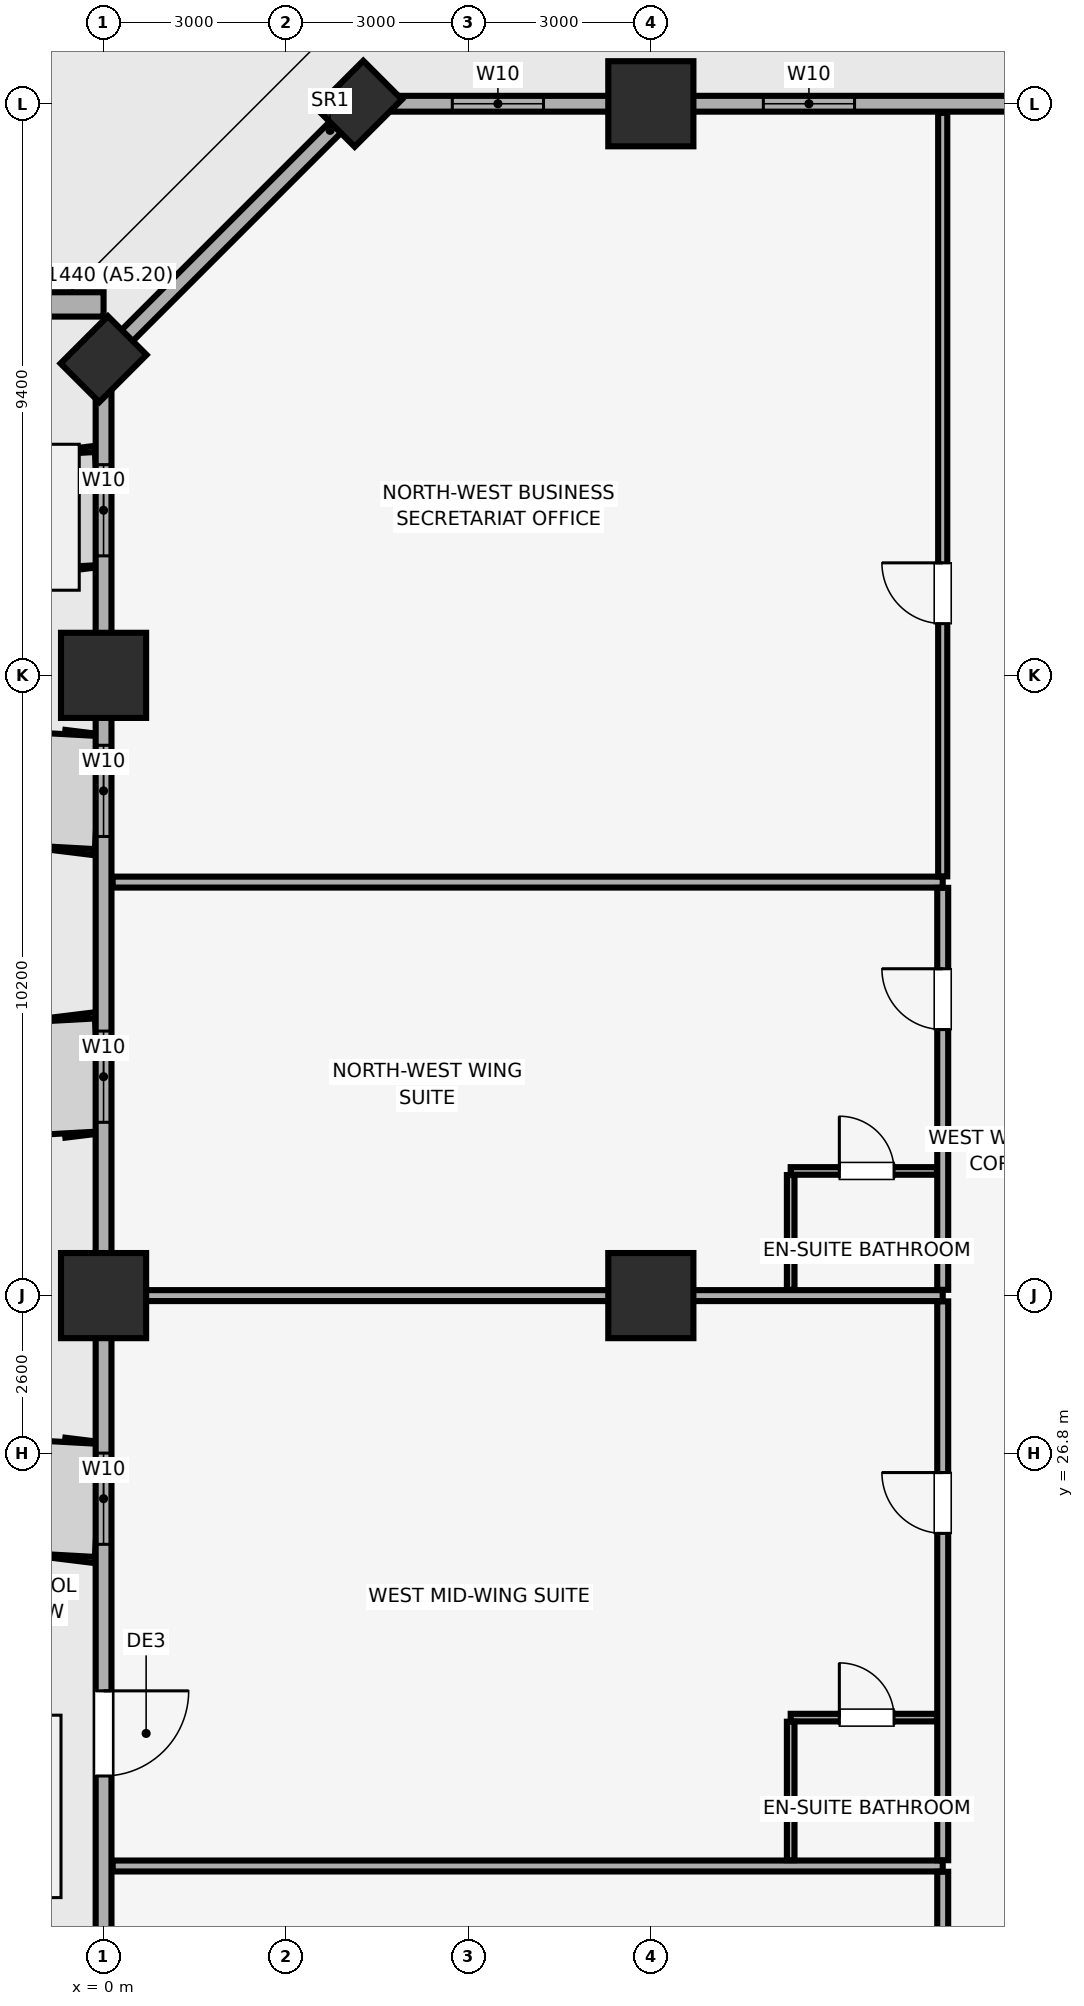
"""IFC4 building model, lengths in metres.
Left out: names, types, materials, properties, quantities, classifications, styles, units other than length and angle.
Written with IfcOpenShell. Run it as: python <this file> out.ifc"""

import sys

from ifc_helpers import new_model, si_unit, direction, frame, frame_2d, origin, origin_2d, place, context, subcontext, project, spatial, rectangle, extrude, element, fill, save


model = new_model("IFC4")
c1 = context("Model", 3, precision=1e-05, world=origin(), true_north=direction((0.0, 1.0)))
c2 = subcontext(c1, "Body", "Model", "MODEL_VIEW")
j1 = project(units=[si_unit("LENGTHUNIT", "METRE"), si_unit("PLANEANGLEUNIT", "RADIAN")], contexts=[c1])
p1 = place(None, origin())
s1 = spatial("IfcSite", under=j1, at=p1, CompositionType="ELEMENT")
p2 = place(p1, origin())
s2 = spatial("IfcBuilding", under=s1, at=p2, CompositionType="ELEMENT")
p3 = place(p2, frame((0.0, 0.0, 31.4)))
s3 = spatial("IfcBuildingStorey", under=s2, at=p3, CompositionType="ELEMENT", Elevation=31.4)
for number, where, z_axis, x_axis in (
    (1, (0.0, 29.4, 0.0), (0.0, 0.0, 1.0), (1.0, 0.0, 0.0)),
    (2, (0.0, 39.6, 0.0), (0.0, 0.0, 1.0), (1.0, 0.0, 0.0)),
):
    element("IfcColumn", number, at=place(p3, frame(where, z_axis=z_axis, x_axis=x_axis)), inside=s3, PredefinedType="COLUMN", context=c2, shape_type="SweptSolid", body=[
        extrude(rectangle(XDim=1.4, YDim=1.4, at=origin_2d()), origin(), (0.0, 0.0, 1.0), 3.51),
    ])
for number, where, z_axis, x_axis in (
    (3, (4.2, 49.0, 0.0), (0.0, 0.0, 1.0), (0.707, 0.707, 0.0)),
    (4, (0.0, 44.8, 0.0), (0.0, 0.0, 1.0), (0.707, 0.707, 0.0)),
):
    element("IfcColumn", number, at=place(p3, frame(where, z_axis=z_axis, x_axis=x_axis)), inside=s3, PredefinedType="PILASTER", context=c2, shape_type="SweptSolid", body=[
        extrude(rectangle(XDim=1.1, YDim=0.9, at=origin_2d()), origin(), (0.0, 0.0, 1.0), 3.51),
    ])
for number, where, z_axis, x_axis in (
    (5, (9.0, 29.4, 0.0), (0.0, 0.0, 1.0), (1.0, 0.0, 0.0)),
    (6, (9.0, 49.0, 0.0), (0.0, 0.0, 1.0), (1.0, 0.0, 0.0)),
):
    element("IfcColumn", number, at=place(p3, frame(where, z_axis=z_axis, x_axis=x_axis)), inside=s3, PredefinedType="COLUMN", context=c2, shape_type="SweptSolid", body=[
        extrude(rectangle(XDim=1.4, YDim=1.4, at=origin_2d()), origin(), (0.0, 0.0, 1.0), 3.51),
    ])
p4 = place(p3, frame((79.8, 49.0, 0.0), z_axis=(0.0, 0.0, 1.0), x_axis=(-1.0, 0.0, 0.0)))
e7 = element("IfcWall", 7, at=p4, inside=s3, PredefinedType="SOLIDWALL", context=c2, shape_type="SweptSolid", body=[
    extrude(rectangle(XDim=75.6, YDim=0.26, at=frame_2d((37.8, 0.0))), origin(), (0.0, 0.0, 1.0), 2.56),
])
p5 = place(p4, frame((72.565, 0.0, 0.85)))
e8 = element("IfcOpeningElement", 8, at=p5, cuts=e7, PredefinedType="OPENING", context=c2, shape_type="SweptSolid", body=[
    extrude(rectangle(XDim=1.5, YDim=1.4, at=frame_2d((0.75, 0.7))), frame((0.0, 0.14, 0.0), z_axis=(0.0, -1.0, 0.0), x_axis=(1.0, 0.0, 0.0)), (0.0, 0.0, 1.0), 0.28),
])
p6 = place(p4, frame((67.45, 0.0, 0.85)))
e9 = element("IfcOpeningElement", 9, at=p6, cuts=e7, PredefinedType="OPENING", context=c2, shape_type="SweptSolid", body=[
    extrude(rectangle(XDim=1.5, YDim=1.4, at=frame_2d((0.75, 0.7))), frame((0.0, 0.14, 0.0), z_axis=(0.0, -1.0, 0.0), x_axis=(1.0, 0.0, 0.0)), (0.0, 0.0, 1.0), 0.28),
])
p7 = place(p4, frame((6.65, 0.0, 0.85)))
e10 = element("IfcOpeningElement", 10, at=p7, cuts=e7, PredefinedType="OPENING", context=c2, shape_type="SweptSolid", body=[
    extrude(rectangle(XDim=1.5, YDim=1.4, at=frame_2d((0.75, 0.7))), frame((0.0, 0.14, 0.0), z_axis=(0.0, -1.0, 0.0), x_axis=(1.0, 0.0, 0.0)), (0.0, 0.0, 1.0), 0.28),
])
p8 = place(p4, frame((1.535, 0.0, 0.85)))
e11 = element("IfcOpeningElement", 11, at=p8, cuts=e7, PredefinedType="OPENING", context=c2, shape_type="SweptSolid", body=[
    extrude(rectangle(XDim=1.5, YDim=1.4, at=frame_2d((0.75, 0.7))), frame((0.0, 0.14, 0.0), z_axis=(0.0, -1.0, 0.0), x_axis=(1.0, 0.0, 0.0)), (0.0, 0.0, 1.0), 0.28),
])
p9 = place(p4, frame((51.365, 0.0, 0.9)))
e12 = element("IfcOpeningElement", 12, at=p9, cuts=e7, PredefinedType="OPENING", context=c2, shape_type="SweptSolid", body=[
    extrude(rectangle(XDim=1.5, YDim=1.4, at=frame_2d((0.75, 0.7))), frame((0.0, 0.14, 0.0), z_axis=(0.0, -1.0, 0.0), x_axis=(1.0, 0.0, 0.0)), (0.0, 0.0, 1.0), 0.28),
])
p10 = place(p4, frame((46.0, 0.0, 0.9)))
e13 = element("IfcOpeningElement", 13, at=p10, cuts=e7, PredefinedType="OPENING", context=c2, shape_type="SweptSolid", body=[
    extrude(rectangle(XDim=1.5, YDim=1.4, at=frame_2d((0.75, 0.7))), frame((0.0, 0.14, 0.0), z_axis=(0.0, -1.0, 0.0), x_axis=(1.0, 0.0, 0.0)), (0.0, 0.0, 1.0), 0.28),
])
p11 = place(p4, frame((29.15, 0.0, 0.9)))
e14 = element("IfcOpeningElement", 14, at=p11, cuts=e7, PredefinedType="OPENING", context=c2, shape_type="SweptSolid", body=[
    extrude(rectangle(XDim=1.5, YDim=1.4, at=frame_2d((0.75, 0.7))), frame((0.0, 0.14, 0.0), z_axis=(0.0, -1.0, 0.0), x_axis=(1.0, 0.0, 0.0)), (0.0, 0.0, 1.0), 0.28),
])
p12 = place(p4, frame((23.485, 0.0, 0.9)))
e15 = element("IfcOpeningElement", 15, at=p12, cuts=e7, PredefinedType="OPENING", context=c2, shape_type="SweptSolid", body=[
    extrude(rectangle(XDim=1.5, YDim=1.4, at=frame_2d((0.75, 0.7))), frame((0.0, 0.14, 0.0), z_axis=(0.0, -1.0, 0.0), x_axis=(1.0, 0.0, 0.0)), (0.0, 0.0, 1.0), 0.28),
])
p13 = place(p3, frame((4.2, 49.0, 0.0), z_axis=(0.0, 0.0, 1.0), x_axis=(-0.707106781187, -0.707106781187, 0.0)))
e16 = element("IfcWall", 16, at=p13, inside=s3, PredefinedType="SOLIDWALL", context=c2, shape_type="SweptSolid", body=[
    extrude(rectangle(XDim=5.94, YDim=0.26, at=frame_2d((2.97, 0.0))), origin(), (0.0, 0.0, 1.0), 2.56),
])
p14 = place(p3, frame((0.0, 44.8, 0.0), z_axis=(0.0, 0.0, 1.0), x_axis=(0.0, -1.0, 0.0)))
e17 = element("IfcWall", 17, at=p14, inside=s3, PredefinedType="SOLIDWALL", context=c2, shape_type="SweptSolid", body=[
    extrude(rectangle(XDim=40.6, YDim=0.26, at=frame_2d((20.3, 0.0))), origin(), (0.0, 0.0, 1.0), 2.56),
])
p15 = place(p14, frame((21.9, 0.0, 0.0)))
e18 = element("IfcOpeningElement", 18, at=p15, cuts=e17, PredefinedType="OPENING", context=c2, shape_type="SweptSolid", body=[
    extrude(rectangle(XDim=1.4, YDim=2.2, at=frame_2d((0.7, 1.1))), frame((0.0, 0.14, 0.0), z_axis=(0.0, -1.0, 0.0), x_axis=(1.0, 0.0, 0.0)), (0.0, 0.0, 1.0), 0.28),
])
p16 = place(p14, frame((31.425, 0.0, 0.85)))
e19 = element("IfcOpeningElement", 19, at=p16, cuts=e17, PredefinedType="OPENING", context=c2, shape_type="SweptSolid", body=[
    extrude(rectangle(XDim=1.5, YDim=1.4, at=frame_2d((0.75, 0.7))), frame((0.0, 0.14, 0.0), z_axis=(0.0, -1.0, 0.0), x_axis=(1.0, 0.0, 0.0)), (0.0, 0.0, 1.0), 0.28),
])
p17 = place(p14, frame((26.34, 0.0, 0.85)))
e20 = element("IfcOpeningElement", 20, at=p17, cuts=e17, PredefinedType="OPENING", context=c2, shape_type="SweptSolid", body=[
    extrude(rectangle(XDim=1.5, YDim=1.4, at=frame_2d((0.75, 0.7))), frame((0.0, 0.14, 0.0), z_axis=(0.0, -1.0, 0.0), x_axis=(1.0, 0.0, 0.0)), (0.0, 0.0, 1.0), 0.28),
])
p18 = place(p14, frame((17.99, 0.0, 0.85)))
e21 = element("IfcOpeningElement", 21, at=p18, cuts=e17, PredefinedType="OPENING", context=c2, shape_type="SweptSolid", body=[
    extrude(rectangle(XDim=1.5, YDim=1.4, at=frame_2d((0.75, 0.7))), frame((0.0, 0.14, 0.0), z_axis=(0.0, -1.0, 0.0), x_axis=(1.0, 0.0, 0.0)), (0.0, 0.0, 1.0), 0.28),
])
p19 = place(p14, frame((11.05, 0.0, 0.85)))
e22 = element("IfcOpeningElement", 22, at=p19, cuts=e17, PredefinedType="OPENING", context=c2, shape_type="SweptSolid", body=[
    extrude(rectangle(XDim=1.5, YDim=1.4, at=frame_2d((0.75, 0.7))), frame((0.0, 0.14, 0.0), z_axis=(0.0, -1.0, 0.0), x_axis=(1.0, 0.0, 0.0)), (0.0, 0.0, 1.0), 0.28),
])
p20 = place(p14, frame((6.35, 0.0, 0.85)))
e23 = element("IfcOpeningElement", 23, at=p20, cuts=e17, PredefinedType="OPENING", context=c2, shape_type="SweptSolid", body=[
    extrude(rectangle(XDim=1.5, YDim=1.4, at=frame_2d((0.75, 0.7))), frame((0.0, 0.14, 0.0), z_axis=(0.0, -1.0, 0.0), x_axis=(1.0, 0.0, 0.0)), (0.0, 0.0, 1.0), 0.28),
])
p21 = place(p14, frame((1.735, 0.0, 0.85)))
e24 = element("IfcOpeningElement", 24, at=p21, cuts=e17, PredefinedType="OPENING", context=c2, shape_type="SweptSolid", body=[
    extrude(rectangle(XDim=1.5, YDim=1.4, at=frame_2d((0.75, 0.7))), frame((0.0, 0.14, 0.0), z_axis=(0.0, -1.0, 0.0), x_axis=(1.0, 0.0, 0.0)), (0.0, 0.0, 1.0), 0.28),
])
p22 = place(p3, frame((-3.2, 45.7, -0.24), z_axis=(0.0, 0.0, 1.0), x_axis=(1.0, 0.0, 0.0)))
e25 = element("IfcWall", 25, at=p22, inside=s3, PredefinedType="PARAPET", context=c2, shape_type="SweptSolid", body=[
    extrude(rectangle(XDim=3.2, YDim=0.4, at=frame_2d((1.6, 0.0))), origin(), (0.0, 0.0, 1.0), 1.44),
])
p23 = place(p3, frame((0.15, 20.02, 0.0), z_axis=(0.0, 0.0, 1.0), x_axis=(1.0, 0.0, 0.0)))
e26 = element("IfcWall", 26, at=p23, inside=s3, PredefinedType="PARTITIONING", context=c2, shape_type="SweptSolid", body=[
    extrude(rectangle(XDim=13.65, YDim=0.18, at=frame_2d((6.825, 0.0))), origin(), (0.0, 0.0, 1.0), 3.51),
])
p24 = place(p3, frame((13.8, 10.745, 0.0), z_axis=(0.0, 0.0, 1.0), x_axis=(0.0, 1.0, 0.0)))
e27 = element("IfcWall", 27, at=p24, inside=s3, PredefinedType="PARTITIONING", context=c2, shape_type="SweptSolid", body=[
    extrude(rectangle(XDim=9.18, YDim=0.18, at=frame_2d((4.59, 0.0))), origin(), (0.0, 0.0, 1.0), 3.51),
])
p25 = place(p24, frame((6.655, 0.0, 0.0)))
e28 = element("IfcOpeningElement", 28, at=p25, cuts=e27, PredefinedType="OPENING", context=c2, shape_type="SweptSolid", body=[
    extrude(rectangle(XDim=1.0, YDim=2.15, at=frame_2d((0.5, 1.075))), frame((0.0, 0.1, 0.0), z_axis=(0.0, -1.0, 0.0), x_axis=(1.0, 0.0, 0.0)), (0.0, 0.0, 1.0), 0.2),
])
p26 = place(p3, frame((0.15, 29.4, 0.0), z_axis=(0.0, 0.0, 1.0), x_axis=(1.0, 0.0, 0.0)))
e29 = element("IfcWall", 29, at=p26, inside=s3, PredefinedType="PARTITIONING", context=c2, shape_type="SweptSolid", body=[
    extrude(rectangle(XDim=13.65, YDim=0.18, at=frame_2d((6.825, 0.0))), origin(), (0.0, 0.0, 1.0), 2.86),
])
p27 = place(p3, frame((13.8, 20.115, 0.0), z_axis=(0.0, 0.0, 1.0), x_axis=(0.0, 1.0, 0.0)))
e30 = element("IfcWall", 30, at=p27, inside=s3, PredefinedType="PARTITIONING", context=c2, shape_type="SweptSolid", body=[
    extrude(rectangle(XDim=9.19, YDim=0.18, at=frame_2d((4.595, 0.0))), origin(), (0.0, 0.0, 1.0), 3.51),
])
p28 = place(p27, frame((5.375, 0.0, 0.0)))
e31 = element("IfcOpeningElement", 31, at=p28, cuts=e30, PredefinedType="OPENING", context=c2, shape_type="SweptSolid", body=[
    extrude(rectangle(XDim=1.0, YDim=2.15, at=frame_2d((0.5, 1.075))), frame((0.0, 0.1, 0.0), z_axis=(0.0, -1.0, 0.0), x_axis=(1.0, 0.0, 0.0)), (0.0, 0.0, 1.0), 0.2),
])
p29 = place(p3, frame((11.3, 22.46, 0.0), z_axis=(0.0, 0.0, 1.0), x_axis=(1.0, 0.0, 0.0)))
e32 = element("IfcWall", 32, at=p29, inside=s3, PredefinedType="PARTITIONING", context=c2, shape_type="SweptSolid", body=[
    extrude(rectangle(XDim=2.405, YDim=0.125, at=frame_2d((1.203, 0.0))), origin(), (0.0, 0.0, 1.0), 3.51),
])
p30 = place(p29, frame((0.8, 0.0, 0.0)))
e33 = element("IfcOpeningElement", 33, at=p30, cuts=e32, PredefinedType="OPENING", context=c2, shape_type="SweptSolid", body=[
    extrude(rectangle(XDim=0.9, YDim=2.1, at=frame_2d((0.45, 1.05))), frame((0.0, 0.073, 0.0), z_axis=(0.0, -1.0, 0.0), x_axis=(1.0, 0.0, 0.0)), (0.0, 0.0, 1.0), 0.145),
])
p31 = place(p3, frame((11.3, 20.115, 0.0), z_axis=(0.0, 0.0, 1.0), x_axis=(0.0, 1.0, 0.0)))
e34 = element("IfcWall", 34, at=p31, inside=s3, PredefinedType="PARTITIONING", context=c2, shape_type="SweptSolid", body=[
    extrude(rectangle(XDim=2.278, YDim=0.125, at=frame_2d((1.139, 0.0))), origin(), (0.0, 0.0, 1.0), 3.51),
])
p32 = place(p3, frame((0.15, 36.2, 0.0), z_axis=(0.0, 0.0, 1.0), x_axis=(1.0, 0.0, 0.0)))
e35 = element("IfcWall", 35, at=p32, inside=s3, PredefinedType="PARTITIONING", context=c2, shape_type="SweptSolid", body=[
    extrude(rectangle(XDim=13.65, YDim=0.18, at=frame_2d((6.825, 0.0))), origin(), (0.0, 0.0, 1.0), 3.51),
])
p33 = place(p3, frame((13.8, 29.495, 0.0), z_axis=(0.0, 0.0, 1.0), x_axis=(0.0, 1.0, 0.0)))
e36 = element("IfcWall", 36, at=p33, inside=s3, PredefinedType="PARTITIONING", context=c2, shape_type="SweptSolid", body=[
    extrude(rectangle(XDim=6.61, YDim=0.18, at=frame_2d((3.305, 0.0))), origin(), (0.0, 0.0, 1.0), 3.51),
])
p34 = place(p33, frame((4.28, 0.0, 0.0)))
e37 = element("IfcOpeningElement", 37, at=p34, cuts=e36, PredefinedType="OPENING", context=c2, shape_type="SweptSolid", body=[
    extrude(rectangle(XDim=1.0, YDim=2.15, at=frame_2d((0.5, 1.075))), frame((0.0, 0.1, 0.0), z_axis=(0.0, -1.0, 0.0), x_axis=(1.0, 0.0, 0.0)), (0.0, 0.0, 1.0), 0.2),
])
p35 = place(p3, frame((11.3, 31.45, 0.0), z_axis=(0.0, 0.0, 1.0), x_axis=(1.0, 0.0, 0.0)))
e38 = element("IfcWall", 38, at=p35, inside=s3, PredefinedType="PARTITIONING", context=c2, shape_type="SweptSolid", body=[
    extrude(rectangle(XDim=2.405, YDim=0.125, at=frame_2d((1.203, 0.0))), origin(), (0.0, 0.0, 1.0), 3.51),
])
p36 = place(p35, frame((0.8, 0.0, 0.0)))
e39 = element("IfcOpeningElement", 39, at=p36, cuts=e38, PredefinedType="OPENING", context=c2, shape_type="SweptSolid", body=[
    extrude(rectangle(XDim=0.9, YDim=2.1, at=frame_2d((0.45, 1.05))), frame((0.0, 0.073, 0.0), z_axis=(0.0, -1.0, 0.0), x_axis=(1.0, 0.0, 0.0)), (0.0, 0.0, 1.0), 0.145),
])
p37 = place(p3, frame((11.3, 29.495, 0.0), z_axis=(0.0, 0.0, 1.0), x_axis=(0.0, 1.0, 0.0)))
e40 = element("IfcWall", 40, at=p37, inside=s3, PredefinedType="PARTITIONING", context=c2, shape_type="SweptSolid", body=[
    extrude(rectangle(XDim=1.887, YDim=0.125, at=frame_2d((0.944, 0.0))), origin(), (0.0, 0.0, 1.0), 3.51),
])
p38 = place(p3, frame((13.8, 36.295, 0.0), z_axis=(0.0, 0.0, 1.0), x_axis=(0.0, 1.0, 0.0)))
e41 = element("IfcWall", 41, at=p38, inside=s3, PredefinedType="PARTITIONING", context=c2, shape_type="SweptSolid", body=[
    extrude(rectangle(XDim=12.555, YDim=0.15, at=frame_2d((6.278, 0.0))), origin(), (0.0, 0.0, 1.0), 3.51),
])
p39 = place(p38, frame((4.155, 0.0, 0.0)))
e42 = element("IfcOpeningElement", 42, at=p39, cuts=e41, PredefinedType="OPENING", context=c2, shape_type="SweptSolid", body=[
    extrude(rectangle(XDim=1.0, YDim=2.15, at=frame_2d((0.5, 1.075))), frame((0.0, 0.085, 0.0), z_axis=(0.0, -1.0, 0.0), x_axis=(1.0, 0.0, 0.0)), (0.0, 0.0, 1.0), 0.17),
])
p40 = place(p3, frame((0.0, 0.0, -0.28)))
p41 = place(p40, frame((-1.6, 21.0, 0.23)))
e43 = element("IfcWindow", 43, at=p41, inside=s3, PartitioningType="SINGLE_PANEL", PredefinedType="SKYLIGHT", context=c2, shape_type="SweptSolid", body=[
    extrude(rectangle(XDim=1.8, YDim=3.0, at=origin_2d()), origin(), (0.0, 0.0, 1.0), 0.05),
])
p42 = place(p40, frame((-1.6, 42.2, 0.23)))
e44 = element("IfcWindow", 44, at=p42, inside=s3, PartitioningType="SINGLE_PANEL", PredefinedType="SKYLIGHT", context=c2, shape_type="SweptSolid", body=[
    extrude(rectangle(XDim=2.4, YDim=2.4, at=origin_2d()), origin(), (0.0, 0.0, 1.0), 0.05),
])
p43 = place(p15, origin())
e45 = element("IfcDoor", 45, at=p43, inside=s3, OperationType="SINGLE_SWING_LEFT", PredefinedType="DOOR", context=c2, shape_type="SweptSolid", body=[
    extrude(rectangle(XDim=1.4, YDim=2.2, at=frame_2d((0.7, 1.1))), frame((0.0, 0.025, 0.0), z_axis=(0.0, -1.0, 0.0), x_axis=(1.0, 0.0, 0.0)), (0.0, 0.0, 1.0), 0.05),
])
fill(e18, e45)
p44 = place(p18, origin())
e46 = element("IfcWindow", 46, at=p44, inside=s3, PartitioningType="SINGLE_PANEL", PredefinedType="WINDOW", context=c2, shape_type="SweptSolid", body=[
    extrude(rectangle(XDim=1.5, YDim=1.4, at=frame_2d((0.75, 0.7))), frame((0.0, 0.03, 0.0), z_axis=(0.0, -1.0, 0.0), x_axis=(1.0, 0.0, 0.0)), (0.0, 0.0, 1.0), 0.06),
])
fill(e21, e46)
p45 = place(p19, origin())
e47 = element("IfcWindow", 47, at=p45, inside=s3, PartitioningType="SINGLE_PANEL", PredefinedType="WINDOW", context=c2, shape_type="SweptSolid", body=[
    extrude(rectangle(XDim=1.5, YDim=1.4, at=frame_2d((0.75, 0.7))), frame((0.0, 0.03, 0.0), z_axis=(0.0, -1.0, 0.0), x_axis=(1.0, 0.0, 0.0)), (0.0, 0.0, 1.0), 0.06),
])
fill(e22, e47)
p46 = place(p20, origin())
e48 = element("IfcWindow", 48, at=p46, inside=s3, PartitioningType="SINGLE_PANEL", PredefinedType="WINDOW", context=c2, shape_type="SweptSolid", body=[
    extrude(rectangle(XDim=1.5, YDim=1.4, at=frame_2d((0.75, 0.7))), frame((0.0, 0.03, 0.0), z_axis=(0.0, -1.0, 0.0), x_axis=(1.0, 0.0, 0.0)), (0.0, 0.0, 1.0), 0.06),
])
fill(e23, e48)
p47 = place(p21, origin())
e49 = element("IfcWindow", 49, at=p47, inside=s3, PartitioningType="SINGLE_PANEL", PredefinedType="WINDOW", context=c2, shape_type="SweptSolid", body=[
    extrude(rectangle(XDim=1.5, YDim=1.4, at=frame_2d((0.75, 0.7))), frame((0.0, 0.03, 0.0), z_axis=(0.0, -1.0, 0.0), x_axis=(1.0, 0.0, 0.0)), (0.0, 0.0, 1.0), 0.06),
])
fill(e24, e49)
p48 = place(p5, origin())
e50 = element("IfcWindow", 50, at=p48, inside=s3, PartitioningType="SINGLE_PANEL", PredefinedType="WINDOW", context=c2, shape_type="SweptSolid", body=[
    extrude(rectangle(XDim=1.5, YDim=1.4, at=frame_2d((0.75, 0.7))), frame((0.0, 0.03, 0.0), z_axis=(0.0, -1.0, 0.0), x_axis=(1.0, 0.0, 0.0)), (0.0, 0.0, 1.0), 0.06),
])
fill(e8, e50)
p49 = place(p6, origin())
e51 = element("IfcWindow", 51, at=p49, inside=s3, PartitioningType="SINGLE_PANEL", PredefinedType="WINDOW", context=c2, shape_type="SweptSolid", body=[
    extrude(rectangle(XDim=1.5, YDim=1.4, at=frame_2d((0.75, 0.7))), frame((0.0, 0.03, 0.0), z_axis=(0.0, -1.0, 0.0), x_axis=(1.0, 0.0, 0.0)), (0.0, 0.0, 1.0), 0.06),
])
fill(e9, e51)
p50 = place(p28, origin())
e52 = element("IfcDoor", 52, at=p50, inside=s3, OperationType="SINGLE_SWING_RIGHT", PredefinedType="DOOR", context=c2, shape_type="SweptSolid", body=[
    extrude(rectangle(XDim=1.0, YDim=2.15, at=frame_2d((0.5, 1.075))), frame((0.0, 0.025, 0.0), z_axis=(0.0, -1.0, 0.0), x_axis=(1.0, 0.0, 0.0)), (0.0, 0.0, 1.0), 0.05),
])
fill(e31, e52)
p51 = place(p30, origin())
e53 = element("IfcDoor", 53, at=p51, inside=s3, OperationType="SINGLE_SWING_LEFT", PredefinedType="DOOR", context=c2, shape_type="SweptSolid", body=[
    extrude(rectangle(XDim=0.9, YDim=2.1, at=frame_2d((0.45, 1.05))), frame((0.0, 0.025, 0.0), z_axis=(0.0, -1.0, 0.0), x_axis=(1.0, 0.0, 0.0)), (0.0, 0.0, 1.0), 0.05),
])
fill(e33, e53)
p52 = place(p34, origin())
e54 = element("IfcDoor", 54, at=p52, inside=s3, OperationType="SINGLE_SWING_RIGHT", PredefinedType="DOOR", context=c2, shape_type="SweptSolid", body=[
    extrude(rectangle(XDim=1.0, YDim=2.15, at=frame_2d((0.5, 1.075))), frame((0.0, 0.025, 0.0), z_axis=(0.0, -1.0, 0.0), x_axis=(1.0, 0.0, 0.0)), (0.0, 0.0, 1.0), 0.05),
])
fill(e37, e54)
p53 = place(p36, origin())
e55 = element("IfcDoor", 55, at=p53, inside=s3, OperationType="SINGLE_SWING_LEFT", PredefinedType="DOOR", context=c2, shape_type="SweptSolid", body=[
    extrude(rectangle(XDim=0.9, YDim=2.1, at=frame_2d((0.45, 1.05))), frame((0.0, 0.025, 0.0), z_axis=(0.0, -1.0, 0.0), x_axis=(1.0, 0.0, 0.0)), (0.0, 0.0, 1.0), 0.05),
])
fill(e39, e55)
p54 = place(p39, origin())
e56 = element("IfcDoor", 56, at=p54, inside=s3, OperationType="SINGLE_SWING_RIGHT", PredefinedType="DOOR", context=c2, shape_type="SweptSolid", body=[
    extrude(rectangle(XDim=1.0, YDim=2.15, at=frame_2d((0.5, 1.075))), frame((0.0, 0.025, 0.0), z_axis=(0.0, -1.0, 0.0), x_axis=(1.0, 0.0, 0.0)), (0.0, 0.0, 1.0), 0.05),
])
fill(e42, e56)
save(model, sys.argv[1])
